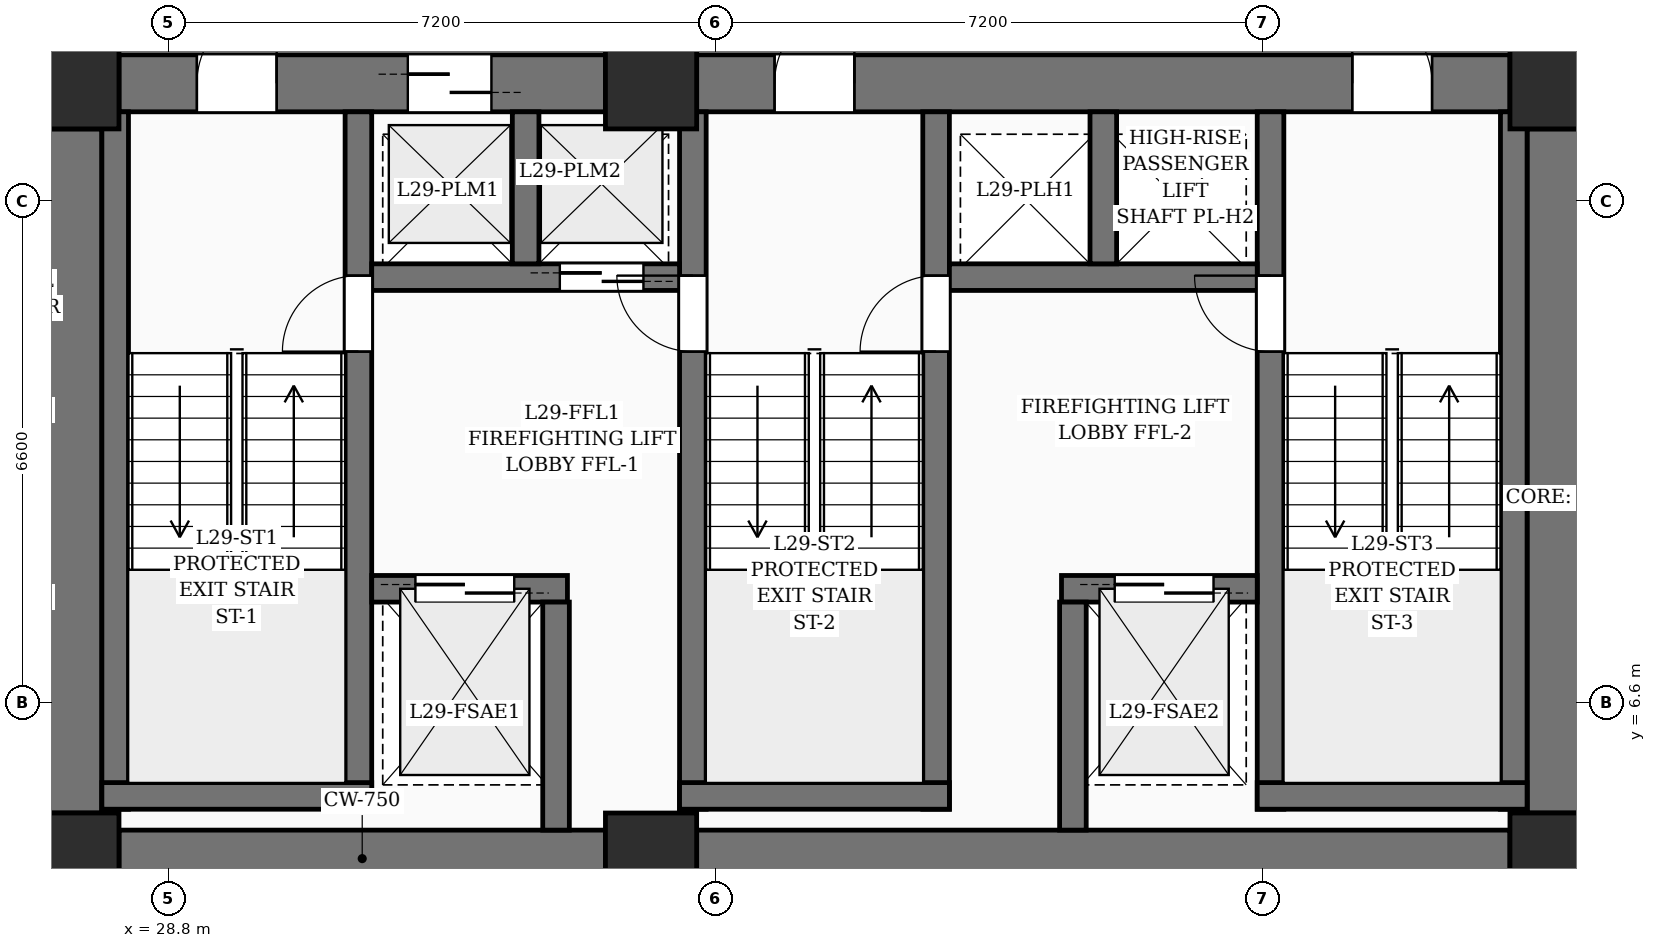
"""IFC4 building model, lengths in metres.
Left out: names, types, materials, properties, quantities, classifications, styles, units other than length and angle.
Written with IfcOpenShell. Run it as: python <this file> out.ifc"""

import sys

from ifc_helpers import new_model, si_unit, direction, frame, frame_2d, origin, origin_2d, place, context, subcontext, project, spatial, rectangle, extrude, element, fill, save


model = new_model("IFC4")
c1 = context("Model", 3, precision=1e-05, world=origin(), true_north=direction((0.0, 1.0)))
c2 = subcontext(c1, "Body", "Model", "MODEL_VIEW")
j1 = project(units=[si_unit("LENGTHUNIT", "METRE"), si_unit("PLANEANGLEUNIT", "RADIAN")], contexts=[c1])
p1 = place(None, origin())
s1 = spatial("IfcSite", under=j1, at=p1, CompositionType="ELEMENT")
p2 = place(p1, origin())
s2 = spatial("IfcBuilding", under=s1, at=p2, CompositionType="ELEMENT")
p3 = place(p2, frame((0.0, 0.0, 117.6)))
s3 = spatial("IfcBuildingStorey", under=s2, at=p3, CompositionType="ELEMENT", Elevation=117.6)
for number, where, z_axis, x_axis in (
    (1, (27.55, 4.55, 0.0), (0.0, 0.0, 1.0), (1.0, 0.0, 0.0)),
    (2, (35.15, 4.55, 0.0), (0.0, 0.0, 1.0), (1.0, 0.0, 0.0)),
    (3, (47.05, 4.55, 0.0), (0.0, 0.0, 1.0), (1.0, 0.0, 0.0)),
    (4, (27.55, 14.75, 0.0), (0.0, 0.0, 1.0), (1.0, 0.0, 0.0)),
    (5, (35.15, 14.75, 0.0), (0.0, 0.0, 1.0), (1.0, 0.0, 0.0)),
    (6, (47.05, 14.75, 0.0), (0.0, 0.0, 1.0), (1.0, 0.0, 0.0)),
):
    element("IfcColumn", number, at=place(p3, frame(where, z_axis=z_axis, x_axis=x_axis)), inside=s3, PredefinedType="COLUMN", context=c2, shape_type="SweptSolid", body=[
        extrude(rectangle(XDim=1.2, YDim=1.2, at=origin_2d()), origin(), (0.0, 0.0, 1.0), 3.6),
    ])
p4 = place(p3, frame((28.15, 4.55, 0.0), z_axis=(0.0, 0.0, 1.0), x_axis=(1.0, 0.0, 0.0)))
e7 = element("IfcWall", 7, at=p4, inside=s3, PredefinedType="SHEAR", context=c2, shape_type="SweptSolid", body=[
    extrude(rectangle(XDim=6.4, YDim=0.75, at=frame_2d((3.2, 0.0))), origin(), (0.0, 0.0, 1.0), 3.6),
])
p5 = place(p3, frame((35.75, 4.55, 0.0), z_axis=(0.0, 0.0, 1.0), x_axis=(1.0, 0.0, 0.0)))
e8 = element("IfcWall", 8, at=p5, inside=s3, PredefinedType="SHEAR", context=c2, shape_type="SweptSolid", body=[
    extrude(rectangle(XDim=10.7, YDim=0.75, at=frame_2d((5.35, 0.0))), origin(), (0.0, 0.0, 1.0), 3.6),
])
p6 = place(p3, frame((28.15, 14.75, 0.0), z_axis=(0.0, 0.0, 1.0), x_axis=(1.0, 0.0, 0.0)))
e9 = element("IfcWall", 9, at=p6, inside=s3, PredefinedType="SHEAR", context=c2, shape_type="SweptSolid", body=[
    extrude(rectangle(XDim=6.4, YDim=0.75, at=frame_2d((3.2, 0.0))), origin(), (0.0, 0.0, 1.0), 3.6),
])
p7 = place(p6, frame((1.025, 0.0, 0.0)))
e10 = element("IfcOpeningElement", 10, at=p7, cuts=e9, PredefinedType="OPENING", context=c2, shape_type="SweptSolid", body=[
    extrude(rectangle(XDim=1.05, YDim=2.15, at=frame_2d((0.525, 1.075))), frame((0.0, 0.385, 0.0), z_axis=(0.0, -1.0, 0.0), x_axis=(1.0, 0.0, 0.0)), (0.0, 0.0, 1.0), 0.77),
])
p8 = place(p6, frame((3.8, 0.0, 0.0)))
e11 = element("IfcOpeningElement", 11, at=p8, cuts=e9, PredefinedType="OPENING", context=c2, shape_type="SweptSolid", body=[
    extrude(rectangle(XDim=1.1, YDim=2.2, at=frame_2d((0.55, 1.1))), frame((0.0, 0.385, 0.0), z_axis=(0.0, -1.0, 0.0), x_axis=(1.0, 0.0, 0.0)), (0.0, 0.0, 1.0), 0.77),
])
p9 = place(p3, frame((35.75, 14.75, 0.0), z_axis=(0.0, 0.0, 1.0), x_axis=(1.0, 0.0, 0.0)))
e12 = element("IfcWall", 12, at=p9, inside=s3, PredefinedType="SHEAR", context=c2, shape_type="SweptSolid", body=[
    extrude(rectangle(XDim=10.7, YDim=0.75, at=frame_2d((5.35, 0.0))), origin(), (0.0, 0.0, 1.0), 3.6),
])
p10 = place(p9, frame((1.025, 0.0, 0.0)))
e13 = element("IfcOpeningElement", 13, at=p10, cuts=e12, PredefinedType="OPENING", context=c2, shape_type="SweptSolid", body=[
    extrude(rectangle(XDim=1.05, YDim=2.15, at=frame_2d((0.525, 1.075))), frame((0.0, 0.385, 0.0), z_axis=(0.0, -1.0, 0.0), x_axis=(1.0, 0.0, 0.0)), (0.0, 0.0, 1.0), 0.77),
])
p11 = place(p9, frame((8.625, 0.0, 0.0)))
e14 = element("IfcOpeningElement", 14, at=p11, cuts=e12, PredefinedType="OPENING", context=c2, shape_type="SweptSolid", body=[
    extrude(rectangle(XDim=1.05, YDim=2.15, at=frame_2d((0.525, 1.075))), frame((0.0, 0.385, 0.0), z_axis=(0.0, -1.0, 0.0), x_axis=(1.0, 0.0, 0.0)), (0.0, 0.0, 1.0), 0.77),
])
for number, where, z_axis, x_axis in (
    (15, (27.55, 5.15, 0.0), (0.0, 0.0, 1.0), (0.0, 1.0, 0.0)),
    (16, (47.05, 5.15, 0.0), (0.0, 0.0, 1.0), (0.0, 1.0, 0.0)),
):
    element("IfcWall", number, at=place(p3, frame(where, z_axis=z_axis, x_axis=x_axis)), inside=s3, PredefinedType="SHEAR", context=c2, shape_type="SweptSolid", body=[
        extrude(rectangle(XDim=9.0, YDim=0.75, at=frame_2d((4.5, 0.0))), origin(), (0.0, 0.0, 1.0), 3.6),
    ])
p12 = place(p3, frame((28.1, 5.2, 0.0), z_axis=(0.0, 0.0, 1.0), x_axis=(0.0, 1.0, 0.0)))
e17 = element("IfcWall", 17, at=p12, inside=s3, PredefinedType="SOLIDWALL", context=c2, shape_type="SweptSolid", body=[
    extrude(rectangle(XDim=9.175, YDim=0.35, at=frame_2d((4.587, 0.0))), origin(), (0.0, 0.0, 1.0), 3.6),
])
p13 = place(p3, frame((31.3, 5.2, 0.0), z_axis=(0.0, 0.0, 1.0), x_axis=(0.0, 1.0, 0.0)))
e18 = element("IfcWall", 18, at=p13, inside=s3, PredefinedType="SOLIDWALL", context=c2, shape_type="SweptSolid", body=[
    extrude(rectangle(XDim=9.175, YDim=0.35, at=frame_2d((4.587, 0.0))), origin(), (0.0, 0.0, 1.0), 3.6),
])
p14 = place(p13, frame((6.02, 0.0, 0.0)))
e19 = element("IfcOpeningElement", 19, at=p14, cuts=e18, PredefinedType="OPENING", context=c2, shape_type="SweptSolid", body=[
    extrude(rectangle(XDim=1.0, YDim=2.15, at=frame_2d((0.5, 1.075))), frame((0.0, 0.185, 0.0), z_axis=(0.0, -1.0, 0.0), x_axis=(1.0, 0.0, 0.0)), (0.0, 0.0, 1.0), 0.37),
])
p15 = place(p3, frame((27.925, 5.375, 0.0), z_axis=(0.0, 0.0, 1.0), x_axis=(1.0, 0.0, 0.0)))
e20 = element("IfcWall", 20, at=p15, inside=s3, PredefinedType="SOLIDWALL", context=c2, shape_type="SweptSolid", body=[
    extrude(rectangle(XDim=3.55, YDim=0.35, at=frame_2d((1.775, 0.0))), origin(), (0.0, 0.0, 1.0), 3.6),
])
p16 = place(p3, frame((35.7, 5.2, 0.0), z_axis=(0.0, 0.0, 1.0), x_axis=(0.0, 1.0, 0.0)))
e21 = element("IfcWall", 21, at=p16, inside=s3, PredefinedType="SOLIDWALL", context=c2, shape_type="SweptSolid", body=[
    extrude(rectangle(XDim=9.175, YDim=0.35, at=frame_2d((4.587, 0.0))), origin(), (0.0, 0.0, 1.0), 3.6),
])
p17 = place(p16, frame((6.02, 0.0, 0.0)))
e22 = element("IfcOpeningElement", 22, at=p17, cuts=e21, PredefinedType="OPENING", context=c2, shape_type="SweptSolid", body=[
    extrude(rectangle(XDim=1.0, YDim=2.15, at=frame_2d((0.5, 1.075))), frame((0.0, 0.185, 0.0), z_axis=(0.0, -1.0, 0.0), x_axis=(1.0, 0.0, 0.0)), (0.0, 0.0, 1.0), 0.37),
])
p18 = place(p3, frame((38.9, 5.2, 0.0), z_axis=(0.0, 0.0, 1.0), x_axis=(0.0, 1.0, 0.0)))
e23 = element("IfcWall", 23, at=p18, inside=s3, PredefinedType="SOLIDWALL", context=c2, shape_type="SweptSolid", body=[
    extrude(rectangle(XDim=9.175, YDim=0.35, at=frame_2d((4.587, 0.0))), origin(), (0.0, 0.0, 1.0), 3.6),
])
p19 = place(p18, frame((6.02, 0.0, 0.0)))
e24 = element("IfcOpeningElement", 24, at=p19, cuts=e23, PredefinedType="OPENING", context=c2, shape_type="SweptSolid", body=[
    extrude(rectangle(XDim=1.0, YDim=2.15, at=frame_2d((0.5, 1.075))), frame((0.0, 0.185, 0.0), z_axis=(0.0, -1.0, 0.0), x_axis=(1.0, 0.0, 0.0)), (0.0, 0.0, 1.0), 0.37),
])
p20 = place(p3, frame((35.525, 5.375, 0.0), z_axis=(0.0, 0.0, 1.0), x_axis=(1.0, 0.0, 0.0)))
e25 = element("IfcWall", 25, at=p20, inside=s3, PredefinedType="SOLIDWALL", context=c2, shape_type="SweptSolid", body=[
    extrude(rectangle(XDim=3.55, YDim=0.35, at=frame_2d((1.775, 0.0))), origin(), (0.0, 0.0, 1.0), 3.6),
])
p21 = place(p3, frame((43.3, 5.2, 0.0), z_axis=(0.0, 0.0, 1.0), x_axis=(0.0, 1.0, 0.0)))
e26 = element("IfcWall", 26, at=p21, inside=s3, PredefinedType="SOLIDWALL", context=c2, shape_type="SweptSolid", body=[
    extrude(rectangle(XDim=9.175, YDim=0.35, at=frame_2d((4.587, 0.0))), origin(), (0.0, 0.0, 1.0), 3.6),
])
p22 = place(p21, frame((6.02, 0.0, 0.0)))
e27 = element("IfcOpeningElement", 27, at=p22, cuts=e26, PredefinedType="OPENING", context=c2, shape_type="SweptSolid", body=[
    extrude(rectangle(XDim=1.0, YDim=2.15, at=frame_2d((0.5, 1.075))), frame((0.0, 0.185, 0.0), z_axis=(0.0, -1.0, 0.0), x_axis=(1.0, 0.0, 0.0)), (0.0, 0.0, 1.0), 0.37),
])
p23 = place(p3, frame((46.5, 5.2, 0.0), z_axis=(0.0, 0.0, 1.0), x_axis=(0.0, 1.0, 0.0)))
e28 = element("IfcWall", 28, at=p23, inside=s3, PredefinedType="SOLIDWALL", context=c2, shape_type="SweptSolid", body=[
    extrude(rectangle(XDim=9.175, YDim=0.35, at=frame_2d((4.587, 0.0))), origin(), (0.0, 0.0, 1.0), 3.6),
])
p24 = place(p3, frame((43.125, 5.375, 0.0), z_axis=(0.0, 0.0, 1.0), x_axis=(1.0, 0.0, 0.0)))
e29 = element("IfcWall", 29, at=p24, inside=s3, PredefinedType="SOLIDWALL", context=c2, shape_type="SweptSolid", body=[
    extrude(rectangle(XDim=3.55, YDim=0.35, at=frame_2d((1.775, 0.0))), origin(), (0.0, 0.0, 1.0), 3.6),
])
p25 = place(p3, frame((31.475, 8.1, 0.0), z_axis=(0.0, 0.0, 1.0), x_axis=(1.0, 0.0, 0.0)))
e30 = element("IfcWall", 30, at=p25, inside=s3, PredefinedType="SOLIDWALL", context=c2, shape_type="SweptSolid", body=[
    extrude(rectangle(XDim=2.575, YDim=0.35, at=frame_2d((1.288, 0.0))), origin(), (0.0, 0.0, 1.0), 3.6),
])
p26 = place(p25, frame((0.575, 0.0, 0.0)))
e31 = element("IfcOpeningElement", 31, at=p26, cuts=e30, PredefinedType="OPENING", context=c2, shape_type="SweptSolid", body=[
    extrude(rectangle(XDim=1.3, YDim=2.25, at=frame_2d((0.65, 1.125))), frame((0.0, 0.185, 0.0), z_axis=(0.0, -1.0, 0.0), x_axis=(1.0, 0.0, 0.0)), (0.0, 0.0, 1.0), 0.37),
])
p27 = place(p3, frame((40.55, 8.1, 0.0), z_axis=(0.0, 0.0, 1.0), x_axis=(1.0, 0.0, 0.0)))
e32 = element("IfcWall", 32, at=p27, inside=s3, PredefinedType="SOLIDWALL", context=c2, shape_type="SweptSolid", body=[
    extrude(rectangle(XDim=2.575, YDim=0.35, at=frame_2d((1.288, 0.0))), origin(), (0.0, 0.0, 1.0), 3.6),
])
p28 = place(p27, frame((0.7, 0.0, 0.0)))
e33 = element("IfcOpeningElement", 33, at=p28, cuts=e32, PredefinedType="OPENING", context=c2, shape_type="SweptSolid", body=[
    extrude(rectangle(XDim=1.3, YDim=2.25, at=frame_2d((0.65, 1.125))), frame((0.0, 0.185, 0.0), z_axis=(0.0, -1.0, 0.0), x_axis=(1.0, 0.0, 0.0)), (0.0, 0.0, 1.0), 0.37),
])
for number, where, z_axis, x_axis in (
    (34, (33.9, 4.925, 0.0), (0.0, 0.0, 1.0), (0.0, 1.0, 0.0)),
    (35, (40.7, 4.925, 0.0), (0.0, 0.0, 1.0), (0.0, 1.0, 0.0)),
):
    element("IfcWall", number, at=place(p3, frame(where, z_axis=z_axis, x_axis=x_axis)), inside=s3, PredefinedType="SOLIDWALL", context=c2, shape_type="SweptSolid", body=[
        extrude(rectangle(XDim=3.0, YDim=0.35, at=frame_2d((1.5, 0.0))), origin(), (0.0, 0.0, 1.0), 3.6),
    ])
p29 = place(p3, frame((31.475, 12.2, 0.0), z_axis=(0.0, 0.0, 1.0), x_axis=(1.0, 0.0, 0.0)))
e36 = element("IfcWall", 36, at=p29, inside=s3, PredefinedType="SOLIDWALL", context=c2, shape_type="SweptSolid", body=[
    extrude(rectangle(XDim=4.05, YDim=0.35, at=frame_2d((2.025, 0.0))), origin(), (0.0, 0.0, 1.0), 3.6),
])
p30 = place(p29, frame((2.475, 0.0, 0.0)))
e37 = element("IfcOpeningElement", 37, at=p30, cuts=e36, PredefinedType="OPENING", context=c2, shape_type="SweptSolid", body=[
    extrude(rectangle(XDim=1.1, YDim=2.2, at=frame_2d((0.55, 1.1))), frame((0.0, 0.185, 0.0), z_axis=(0.0, -1.0, 0.0), x_axis=(1.0, 0.0, 0.0)), (0.0, 0.0, 1.0), 0.37),
])
p31 = place(p3, frame((33.5, 12.375, 0.0), z_axis=(0.0, 0.0, 1.0), x_axis=(0.0, 1.0, 0.0)))
e38 = element("IfcWall", 38, at=p31, inside=s3, PredefinedType="SOLIDWALL", context=c2, shape_type="SweptSolid", body=[
    extrude(rectangle(XDim=2.0, YDim=0.35, at=frame_2d((1.0, 0.0))), origin(), (0.0, 0.0, 1.0), 3.6),
])
p32 = place(p3, frame((39.075, 12.2, 0.0), z_axis=(0.0, 0.0, 1.0), x_axis=(1.0, 0.0, 0.0)))
e39 = element("IfcWall", 39, at=p32, inside=s3, PredefinedType="SOLIDWALL", context=c2, shape_type="SweptSolid", body=[
    extrude(rectangle(XDim=4.05, YDim=0.35, at=frame_2d((2.025, 0.0))), origin(), (0.0, 0.0, 1.0), 3.6),
])
p33 = place(p3, frame((41.1, 12.375, 0.0), z_axis=(0.0, 0.0, 1.0), x_axis=(0.0, 1.0, 0.0)))
e40 = element("IfcWall", 40, at=p33, inside=s3, PredefinedType="SOLIDWALL", context=c2, shape_type="SweptSolid", body=[
    extrude(rectangle(XDim=2.0, YDim=0.35, at=frame_2d((1.0, 0.0))), origin(), (0.0, 0.0, 1.0), 3.6),
])
p34 = place(p7, origin())
e41 = element("IfcDoor", 41, at=p34, inside=s3, OperationType="SINGLE_SWING_RIGHT", PredefinedType="DOOR", context=c2, shape_type="SweptSolid", body=[
    extrude(rectangle(XDim=1.05, YDim=2.15, at=frame_2d((0.525, 1.075))), frame((0.0, 0.025, 0.0), z_axis=(0.0, -1.0, 0.0), x_axis=(1.0, 0.0, 0.0)), (0.0, 0.0, 1.0), 0.05),
])
fill(e10, e41)
p35 = place(p10, origin())
e42 = element("IfcDoor", 42, at=p35, inside=s3, OperationType="SINGLE_SWING_RIGHT", PredefinedType="DOOR", context=c2, shape_type="SweptSolid", body=[
    extrude(rectangle(XDim=1.05, YDim=2.15, at=frame_2d((0.525, 1.075))), frame((0.0, 0.025, 0.0), z_axis=(0.0, -1.0, 0.0), x_axis=(1.0, 0.0, 0.0)), (0.0, 0.0, 1.0), 0.05),
])
fill(e13, e42)
p36 = place(p11, origin())
e43 = element("IfcDoor", 43, at=p36, inside=s3, OperationType="SINGLE_SWING_LEFT", PredefinedType="DOOR", context=c2, shape_type="SweptSolid", body=[
    extrude(rectangle(XDim=1.05, YDim=2.15, at=frame_2d((0.525, 1.075))), frame((0.0, 0.025, 0.0), z_axis=(0.0, -1.0, 0.0), x_axis=(1.0, 0.0, 0.0)), (0.0, 0.0, 1.0), 0.05),
])
fill(e14, e43)
p37 = place(p14, origin())
e44 = element("IfcDoor", 44, at=p37, inside=s3, OperationType="SINGLE_SWING_LEFT", PredefinedType="DOOR", context=c2, shape_type="SweptSolid", body=[
    extrude(rectangle(XDim=1.0, YDim=2.15, at=frame_2d((0.5, 1.075))), frame((0.0, 0.025, 0.0), z_axis=(0.0, -1.0, 0.0), x_axis=(1.0, 0.0, 0.0)), (0.0, 0.0, 1.0), 0.05),
])
fill(e19, e44)
p38 = place(p17, origin())
e45 = element("IfcDoor", 45, at=p38, inside=s3, OperationType="SINGLE_SWING_RIGHT", PredefinedType="DOOR", context=c2, shape_type="SweptSolid", body=[
    extrude(rectangle(XDim=1.0, YDim=2.15, at=frame_2d((0.5, 1.075))), frame((0.0, 0.025, 0.0), z_axis=(0.0, -1.0, 0.0), x_axis=(1.0, 0.0, 0.0)), (0.0, 0.0, 1.0), 0.05),
])
fill(e22, e45)
p39 = place(p19, origin())
e46 = element("IfcDoor", 46, at=p39, inside=s3, OperationType="SINGLE_SWING_LEFT", PredefinedType="DOOR", context=c2, shape_type="SweptSolid", body=[
    extrude(rectangle(XDim=1.0, YDim=2.15, at=frame_2d((0.5, 1.075))), frame((0.0, 0.025, 0.0), z_axis=(0.0, -1.0, 0.0), x_axis=(1.0, 0.0, 0.0)), (0.0, 0.0, 1.0), 0.05),
])
fill(e24, e46)
p40 = place(p22, origin())
e47 = element("IfcDoor", 47, at=p40, inside=s3, OperationType="SINGLE_SWING_RIGHT", PredefinedType="DOOR", context=c2, shape_type="SweptSolid", body=[
    extrude(rectangle(XDim=1.0, YDim=2.15, at=frame_2d((0.5, 1.075))), frame((0.0, 0.025, 0.0), z_axis=(0.0, -1.0, 0.0), x_axis=(1.0, 0.0, 0.0)), (0.0, 0.0, 1.0), 0.05),
])
fill(e27, e47)
p41 = place(p26, origin())
e48 = element("IfcDoor", 48, at=p41, inside=s3, OperationType="DOUBLE_DOOR_SLIDING", PredefinedType="DOOR", context=c2, shape_type="SweptSolid", body=[
    extrude(rectangle(XDim=1.3, YDim=2.25, at=frame_2d((0.65, 1.125))), frame((0.0, 0.025, 0.0), z_axis=(0.0, -1.0, 0.0), x_axis=(1.0, 0.0, 0.0)), (0.0, 0.0, 1.0), 0.05),
])
fill(e31, e48)
p42 = place(p28, origin())
e49 = element("IfcDoor", 49, at=p42, inside=s3, OperationType="DOUBLE_DOOR_SLIDING", PredefinedType="DOOR", context=c2, shape_type="SweptSolid", body=[
    extrude(rectangle(XDim=1.3, YDim=2.25, at=frame_2d((0.65, 1.125))), frame((0.0, 0.025, 0.0), z_axis=(0.0, -1.0, 0.0), x_axis=(1.0, 0.0, 0.0)), (0.0, 0.0, 1.0), 0.05),
])
fill(e33, e49)
p43 = place(p8, origin())
e50 = element("IfcDoor", 50, at=p43, inside=s3, OperationType="DOUBLE_DOOR_SLIDING", PredefinedType="DOOR", context=c2, shape_type="SweptSolid", body=[
    extrude(rectangle(XDim=1.1, YDim=2.2, at=frame_2d((0.55, 1.1))), frame((0.0, 0.025, 0.0), z_axis=(0.0, -1.0, 0.0), x_axis=(1.0, 0.0, 0.0)), (0.0, 0.0, 1.0), 0.05),
])
fill(e11, e50)
p44 = place(p30, origin())
e51 = element("IfcDoor", 51, at=p44, inside=s3, OperationType="DOUBLE_DOOR_SLIDING", PredefinedType="DOOR", context=c2, shape_type="SweptSolid", body=[
    extrude(rectangle(XDim=1.1, YDim=2.2, at=frame_2d((0.55, 1.1))), frame((0.0, 0.025, 0.0), z_axis=(0.0, -1.0, 0.0), x_axis=(1.0, 0.0, 0.0)), (0.0, 0.0, 1.0), 0.05),
])
fill(e37, e51)
save(model, sys.argv[1])
